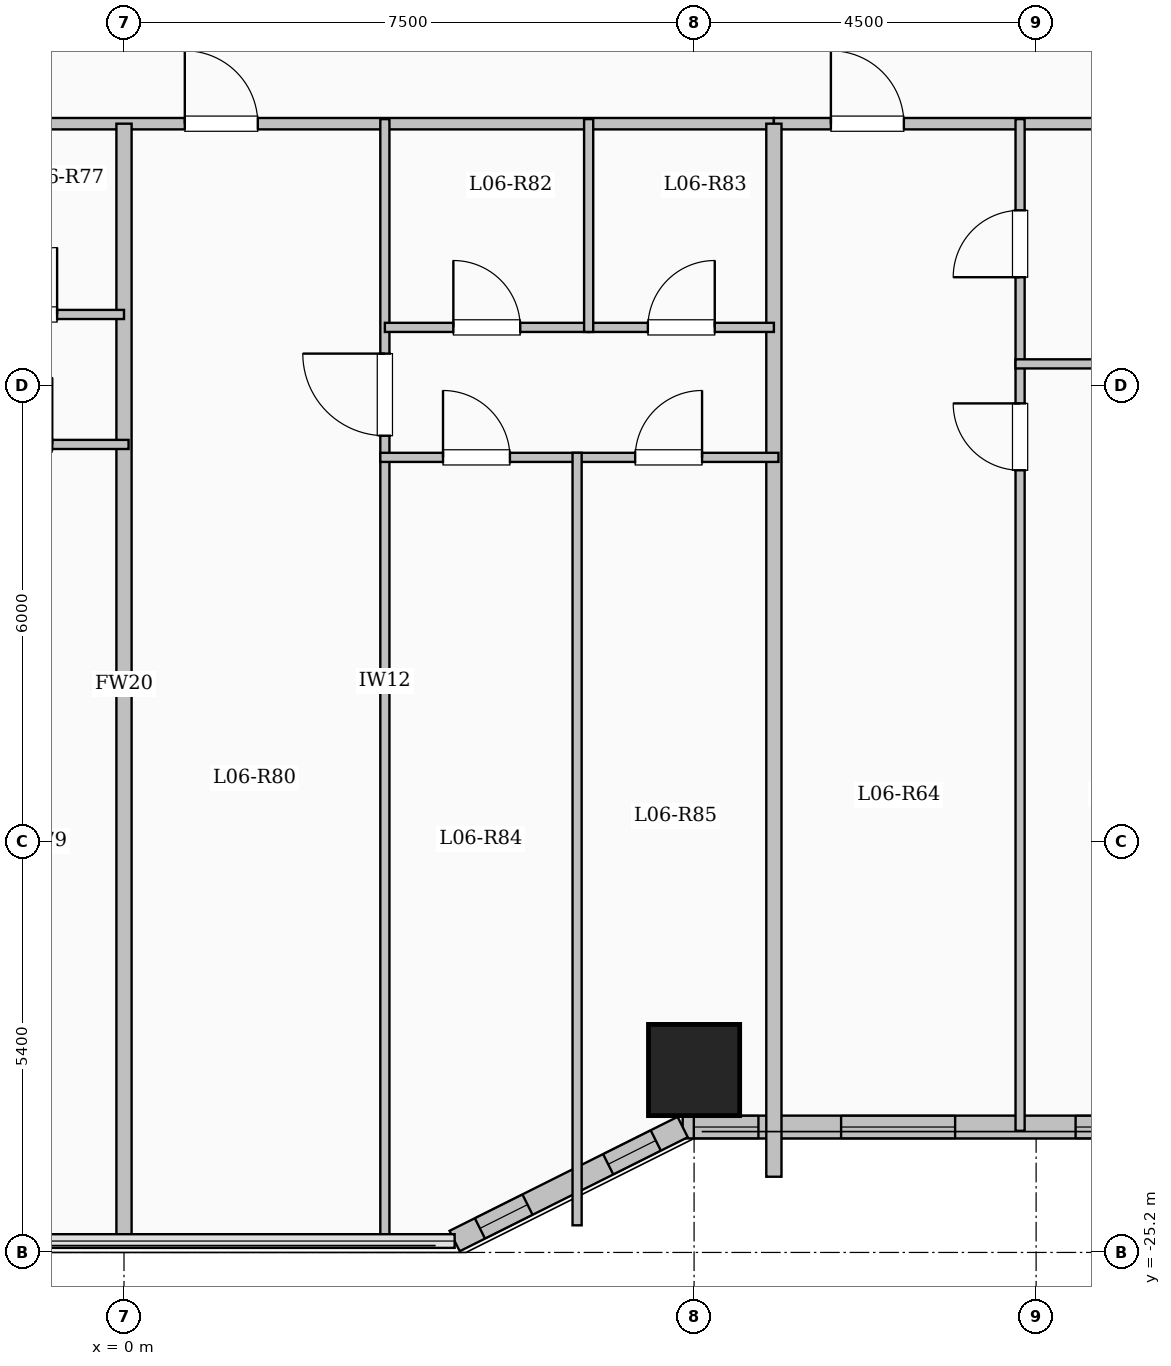
"""IFC4 building model, lengths in metres.
Left out: names, types, materials, properties, quantities, classifications, styles, units other than length and angle.
Written with IfcOpenShell. Run it as: python <this file> out.ifc"""

import sys

from ifc_helpers import new_model, si_unit, direction, frame, frame_2d, origin, origin_2d, place, context, subcontext, project, spatial, rectangle, extrude, element, fill, save


model = new_model("IFC4")
c1 = context("Model", 3, precision=1e-05, world=origin(), true_north=direction((0.0, 1.0)))
c2 = subcontext(c1, "Body", "Model", "MODEL_VIEW")
j1 = project(units=[si_unit("LENGTHUNIT", "METRE"), si_unit("PLANEANGLEUNIT", "RADIAN")], contexts=[c1])
p1 = place(None, origin())
s1 = spatial("IfcSite", under=j1, at=p1, CompositionType="ELEMENT")
p2 = place(p1, origin())
s2 = spatial("IfcBuilding", under=s1, at=p2, CompositionType="ELEMENT")
p3 = place(p2, frame((0.0, 0.0, 27.35)))
s3 = spatial("IfcBuildingStorey", under=s2, at=p3, CompositionType="ELEMENT", Elevation=27.35)
p4 = place(p3, frame((7.5, -22.8, 0.0), z_axis=(0.0, 0.0, 1.0), x_axis=(1.0, 0.0, 0.0)))
e1 = element("IfcColumn", 1, at=p4, inside=s3, PredefinedType="COLUMN", context=c2, shape_type="SweptSolid", body=[
    extrude(rectangle(XDim=1.2, YDim=1.2, at=origin_2d()), origin(), (0.0, 0.0, 1.0), 3.35),
])
p5 = place(p3, frame((22.65, -23.55, 0.0), z_axis=(0.0, 0.0, 1.0), x_axis=(-1.0, 0.0, 0.0)))
e2 = element("IfcWall", 2, at=p5, inside=s3, PredefinedType="SOLIDWALL", context=c2, shape_type="SweptSolid", body=[
    extrude(rectangle(XDim=15.3, YDim=0.3, at=frame_2d((7.65, 0.0))), origin(), (0.0, 0.0, 1.0), 3.1),
])
p6 = place(p5, frame((0.321, 0.0, 0.95)))
e3 = element("IfcOpeningElement", 3, at=p6, cuts=e2, PredefinedType="OPENING", context=c2, shape_type="SweptSolid", body=[
    extrude(rectangle(XDim=1.0, YDim=1.5, at=frame_2d((0.5, 0.75))), frame((0.0, 0.16, 0.0), z_axis=(0.0, -1.0, 0.0), x_axis=(1.0, 0.0, 0.0)), (0.0, 0.0, 1.0), 0.32),
])
p7 = place(p5, frame((2.031, 0.0, 0.95)))
e4 = element("IfcOpeningElement", 4, at=p7, cuts=e2, PredefinedType="OPENING", context=c2, shape_type="SweptSolid", body=[
    extrude(rectangle(XDim=0.85, YDim=1.5, at=frame_2d((0.425, 0.75))), frame((0.0, 0.16, 0.0), z_axis=(0.0, -1.0, 0.0), x_axis=(1.0, 0.0, 0.0)), (0.0, 0.0, 1.0), 0.32),
])
p8 = place(p5, frame((3.562, 0.0, 0.95)))
e5 = element("IfcOpeningElement", 5, at=p8, cuts=e2, PredefinedType="OPENING", context=c2, shape_type="SweptSolid", body=[
    extrude(rectangle(XDim=0.85, YDim=1.5, at=frame_2d((0.425, 0.75))), frame((0.0, 0.16, 0.0), z_axis=(0.0, -1.0, 0.0), x_axis=(1.0, 0.0, 0.0)), (0.0, 0.0, 1.0), 0.32),
])
p9 = place(p5, frame((5.571, 0.0, 0.9)))
e6 = element("IfcOpeningElement", 6, at=p9, cuts=e2, PredefinedType="OPENING", context=c2, shape_type="SweptSolid", body=[
    extrude(rectangle(XDim=1.5, YDim=1.65, at=frame_2d((0.75, 0.825))), frame((0.0, 0.16, 0.0), z_axis=(0.0, -1.0, 0.0), x_axis=(1.0, 0.0, 0.0)), (0.0, 0.0, 1.0), 0.32),
])
p10 = place(p5, frame((8.631, 0.0, 0.9)))
e7 = element("IfcOpeningElement", 7, at=p10, cuts=e2, PredefinedType="OPENING", context=c2, shape_type="SweptSolid", body=[
    extrude(rectangle(XDim=1.5, YDim=1.65, at=frame_2d((0.75, 0.825))), frame((0.0, 0.16, 0.0), z_axis=(0.0, -1.0, 0.0), x_axis=(1.0, 0.0, 0.0)), (0.0, 0.0, 1.0), 0.32),
])
p11 = place(p5, frame((11.716, 0.0, 0.9)))
e8 = element("IfcOpeningElement", 8, at=p11, cuts=e2, PredefinedType="OPENING", context=c2, shape_type="SweptSolid", body=[
    extrude(rectangle(XDim=1.5, YDim=1.65, at=frame_2d((0.75, 0.825))), frame((0.0, 0.16, 0.0), z_axis=(0.0, -1.0, 0.0), x_axis=(1.0, 0.0, 0.0)), (0.0, 0.0, 1.0), 0.32),
])
p12 = place(p5, frame((14.303, 0.0, 0.95)))
e9 = element("IfcOpeningElement", 9, at=p12, cuts=e2, PredefinedType="OPENING", context=c2, shape_type="SweptSolid", body=[
    extrude(rectangle(XDim=0.85, YDim=1.5, at=frame_2d((0.425, 0.75))), frame((0.0, 0.16, 0.0), z_axis=(0.0, -1.0, 0.0), x_axis=(1.0, 0.0, 0.0)), (0.0, 0.0, 1.0), 0.32),
])
p13 = place(p3, frame((7.35, -23.55, 0.0), z_axis=(0.0, 0.0, 1.0), x_axis=(-0.894427191, -0.4472135955, 0.0)))
e10 = element("IfcWall", 10, at=p13, inside=s3, PredefinedType="SOLIDWALL", context=c2, shape_type="SweptSolid", body=[
    extrude(rectangle(XDim=3.354, YDim=0.3, at=frame_2d((1.677, 0.0))), origin(), (0.0, 0.0, 1.0), 3.1),
])
p14 = place(p13, frame((0.396, 0.0, 0.95)))
e11 = element("IfcOpeningElement", 11, at=p14, cuts=e10, PredefinedType="OPENING", context=c2, shape_type="SweptSolid", body=[
    extrude(rectangle(XDim=0.7, YDim=1.5, at=frame_2d((0.35, 0.75))), frame((0.0, 0.16, 0.0), z_axis=(0.0, -1.0, 0.0), x_axis=(1.0, 0.0, 0.0)), (0.0, 0.0, 1.0), 0.32),
])
p15 = place(p13, frame((2.282, 0.0, 0.95)))
e12 = element("IfcOpeningElement", 12, at=p15, cuts=e10, PredefinedType="OPENING", context=c2, shape_type="SweptSolid", body=[
    extrude(rectangle(XDim=0.7, YDim=1.5, at=frame_2d((0.35, 0.75))), frame((0.0, 0.16, 0.0), z_axis=(0.0, -1.0, 0.0), x_axis=(1.0, 0.0, 0.0)), (0.0, 0.0, 1.0), 0.32),
])
p16 = place(p3, frame((-8.55, -10.35, 0.0), z_axis=(0.0, 0.0, 1.0), x_axis=(1.0, 0.0, 0.0)))
e13 = element("IfcWall", 13, at=p16, inside=s3, PredefinedType="PARTITIONING", context=c2, shape_type="SweptSolid", body=[
    extrude(rectangle(XDim=17.1, YDim=0.15, at=frame_2d((8.55, 0.0))), origin(), (0.0, 0.0, 1.0), 3.1),
])
p17 = place(p16, frame((0.8, 0.0, 0.0)))
e14 = element("IfcOpeningElement", 14, at=p17, cuts=e13, PredefinedType="OPENING", context=c2, shape_type="SweptSolid", body=[
    extrude(rectangle(XDim=0.96, YDim=2.15, at=frame_2d((0.48, 1.075))), frame((0.0, 0.085, 0.0), z_axis=(0.0, -1.0, 0.0), x_axis=(1.0, 0.0, 0.0)), (0.0, 0.0, 1.0), 0.17),
])
p18 = place(p16, frame((9.35, 0.0, 0.0)))
e15 = element("IfcOpeningElement", 15, at=p18, cuts=e13, PredefinedType="OPENING", context=c2, shape_type="SweptSolid", body=[
    extrude(rectangle(XDim=0.96, YDim=2.15, at=frame_2d((0.48, 1.075))), frame((0.0, 0.085, 0.0), z_axis=(0.0, -1.0, 0.0), x_axis=(1.0, 0.0, 0.0)), (0.0, 0.0, 1.0), 0.17),
])
p19 = place(p3, frame((8.55, -10.35, 0.0), z_axis=(0.0, 0.0, 1.0), x_axis=(1.0, 0.0, 0.0)))
e16 = element("IfcWall", 16, at=p19, inside=s3, PredefinedType="PARTITIONING", context=c2, shape_type="SweptSolid", body=[
    extrude(rectangle(XDim=14.0, YDim=0.15, at=frame_2d((7.0, 0.0))), origin(), (0.0, 0.0, 1.0), 3.1),
])
p20 = place(p19, frame((0.75, 0.0, 0.0)))
e17 = element("IfcOpeningElement", 17, at=p20, cuts=e16, PredefinedType="OPENING", context=c2, shape_type="SweptSolid", body=[
    extrude(rectangle(XDim=0.96, YDim=2.15, at=frame_2d((0.48, 1.075))), frame((0.0, 0.085, 0.0), z_axis=(0.0, -1.0, 0.0), x_axis=(1.0, 0.0, 0.0)), (0.0, 0.0, 1.0), 0.17),
])
p21 = place(p19, frame((6.888, 0.0, 0.0)))
e18 = element("IfcOpeningElement", 18, at=p21, cuts=e16, PredefinedType="OPENING", context=c2, shape_type="SweptSolid", body=[
    extrude(rectangle(XDim=0.96, YDim=2.15, at=frame_2d((0.48, 1.075))), frame((0.0, 0.085, 0.0), z_axis=(0.0, -1.0, 0.0), x_axis=(1.0, 0.0, 0.0)), (0.0, 0.0, 1.0), 0.17),
])
p22 = place(p3, frame((11.789, -23.6, 0.0), z_axis=(0.0, 0.0, 1.0), x_axis=(0.0, 1.0, 0.0)))
e19 = element("IfcWall", 19, at=p22, inside=s3, PredefinedType="PARTITIONING", context=c2, shape_type="SweptSolid", body=[
    extrude(rectangle(XDim=10.09, YDim=0.12, at=frame_2d((5.045, 0.0))), origin(), (0.0, 0.0, 1.0), 3.1),
])
p23 = place(p22, frame((8.69, 0.0, 0.0)))
e20 = element("IfcOpeningElement", 20, at=p23, cuts=e19, PredefinedType="OPENING", context=c2, shape_type="SweptSolid", body=[
    extrude(rectangle(XDim=0.88, YDim=2.1, at=frame_2d((0.44, 1.05))), frame((0.0, 0.07, 0.0), z_axis=(0.0, -1.0, 0.0), x_axis=(1.0, 0.0, 0.0)), (0.0, 0.0, 1.0), 0.14),
])
p24 = place(p3, frame((11.789, -13.51, 0.0), z_axis=(0.0, 0.0, 1.0), x_axis=(0.0, 1.0, 0.0)))
e21 = element("IfcWall", 21, at=p24, inside=s3, PredefinedType="PARTITIONING", context=c2, shape_type="SweptSolid", body=[
    extrude(rectangle(XDim=3.22, YDim=0.12, at=frame_2d((1.61, 0.0))), origin(), (0.0, 0.0, 1.0), 3.1),
])
p25 = place(p24, frame((1.14, 0.0, 0.0)))
e22 = element("IfcOpeningElement", 22, at=p25, cuts=e21, PredefinedType="OPENING", context=c2, shape_type="SweptSolid", body=[
    extrude(rectangle(XDim=0.88, YDim=2.1, at=frame_2d((0.44, 1.05))), frame((0.0, 0.07, 0.0), z_axis=(0.0, -1.0, 0.0), x_axis=(1.0, 0.0, 0.0)), (0.0, 0.0, 1.0), 0.14),
])
p26 = place(p3, frame((11.729, -13.51, 0.0), z_axis=(0.0, 0.0, 1.0), x_axis=(1.0, 0.0, 0.0)))
e23 = element("IfcWall", 23, at=p26, inside=s3, PredefinedType="PARTITIONING", context=c2, shape_type="SweptSolid", body=[
    extrude(rectangle(XDim=3.069, YDim=0.12, at=frame_2d((1.535, 0.0))), origin(), (0.0, 0.0, 1.0), 3.1),
])
p27 = place(p3, frame((8.55, -24.204, 0.0), z_axis=(0.0, 0.0, 1.0), x_axis=(0.0, 1.0, 0.0)))
e24 = element("IfcWall", 24, at=p27, inside=s3, PredefinedType="SOLIDWALL", context=c2, shape_type="SweptSolid", body=[
    extrude(rectangle(XDim=13.854, YDim=0.2, at=frame_2d((6.927, 0.0))), origin(), (0.0, 0.0, 1.0), 3.1),
])
p28 = place(p3, frame((0.0, -25.08, 0.0), z_axis=(0.0, 0.0, 1.0), x_axis=(0.0, 1.0, 0.0)))
e25 = element("IfcWall", 25, at=p28, inside=s3, PredefinedType="SOLIDWALL", context=c2, shape_type="SweptSolid", body=[
    extrude(rectangle(XDim=14.73, YDim=0.2, at=frame_2d((7.365, 0.0))), origin(), (0.0, 0.0, 1.0), 3.1),
])
p29 = place(p3, frame((-2.64, -12.86, 0.0), z_axis=(0.0, 0.0, 1.0), x_axis=(1.0, 0.0, 0.0)))
e26 = element("IfcWall", 26, at=p29, inside=s3, PredefinedType="PARTITIONING", context=c2, shape_type="SweptSolid", body=[
    extrude(rectangle(XDim=2.64, YDim=0.12, at=frame_2d((1.32, 0.0))), origin(), (0.0, 0.0, 1.0), 2.585),
])
p30 = place(p29, frame((0.88, 0.0, 0.0)))
e27 = element("IfcOpeningElement", 27, at=p30, cuts=e26, PredefinedType="OPENING", context=c2, shape_type="SweptSolid", body=[
    extrude(rectangle(XDim=0.88, YDim=2.1, at=frame_2d((0.44, 1.05))), frame((0.0, 0.07, 0.0), z_axis=(0.0, -1.0, 0.0), x_axis=(1.0, 0.0, 0.0)), (0.0, 0.0, 1.0), 0.14),
])
p31 = place(p3, frame((-5.178, -14.57, 0.0), z_axis=(0.0, 0.0, 1.0), x_axis=(1.0, 0.0, 0.0)))
e28 = element("IfcWall", 28, at=p31, inside=s3, PredefinedType="PARTITIONING", context=c2, shape_type="SweptSolid", body=[
    extrude(rectangle(XDim=5.238, YDim=0.12, at=frame_2d((2.619, 0.0))), origin(), (0.0, 0.0, 1.0), 3.1),
])
p32 = place(p31, frame((0.825, 0.0, 0.0)))
e29 = element("IfcOpeningElement", 29, at=p32, cuts=e28, PredefinedType="OPENING", context=c2, shape_type="SweptSolid", body=[
    extrude(rectangle(XDim=0.88, YDim=2.1, at=frame_2d((0.44, 1.05))), frame((0.0, 0.07, 0.0), z_axis=(0.0, -1.0, 0.0), x_axis=(1.0, 0.0, 0.0)), (0.0, 0.0, 1.0), 0.14),
])
p33 = place(p31, frame((3.354, 0.0, 0.0)))
e30 = element("IfcOpeningElement", 30, at=p33, cuts=e28, PredefinedType="OPENING", context=c2, shape_type="SweptSolid", body=[
    extrude(rectangle(XDim=0.88, YDim=2.1, at=frame_2d((0.44, 1.05))), frame((0.0, 0.07, 0.0), z_axis=(0.0, -1.0, 0.0), x_axis=(1.0, 0.0, 0.0)), (0.0, 0.0, 1.0), 0.14),
])
p34 = place(p3, frame((3.432, -25.08, 0.0), z_axis=(0.0, 0.0, 1.0), x_axis=(0.0, 1.0, 0.0)))
e31 = element("IfcWall", 31, at=p34, inside=s3, PredefinedType="PARTITIONING", context=c2, shape_type="SweptSolid", body=[
    extrude(rectangle(XDim=14.79, YDim=0.12, at=frame_2d((7.395, 0.0))), origin(), (0.0, 0.0, 1.0), 3.1),
])
p35 = place(p34, frame((10.625, 0.0, 0.0)))
e32 = element("IfcOpeningElement", 32, at=p35, cuts=e31, PredefinedType="OPENING", context=c2, shape_type="SweptSolid", body=[
    extrude(rectangle(XDim=1.08, YDim=2.15, at=frame_2d((0.54, 1.075))), frame((0.0, 0.07, 0.0), z_axis=(0.0, -1.0, 0.0), x_axis=(1.0, 0.0, 0.0)), (0.0, 0.0, 1.0), 0.14),
])
p36 = place(p3, frame((3.432, -13.03, 0.0), z_axis=(0.0, 0.0, 1.0), x_axis=(1.0, 0.0, 0.0)))
e33 = element("IfcWall", 33, at=p36, inside=s3, PredefinedType="PARTITIONING", context=c2, shape_type="SweptSolid", body=[
    extrude(rectangle(XDim=2.681, YDim=0.12, at=frame_2d((1.341, 0.0))), origin(), (0.0, 0.0, 1.0), 2.585),
])
p37 = place(p36, frame((0.901, 0.0, 0.0)))
e34 = element("IfcOpeningElement", 34, at=p37, cuts=e33, PredefinedType="OPENING", context=c2, shape_type="SweptSolid", body=[
    extrude(rectangle(XDim=0.88, YDim=2.1, at=frame_2d((0.44, 1.05))), frame((0.0, 0.07, 0.0), z_axis=(0.0, -1.0, 0.0), x_axis=(1.0, 0.0, 0.0)), (0.0, 0.0, 1.0), 0.14),
])
p38 = place(p3, frame((6.113, -13.03, 0.0), z_axis=(0.0, 0.0, 1.0), x_axis=(1.0, 0.0, 0.0)))
e35 = element("IfcWall", 35, at=p38, inside=s3, PredefinedType="PARTITIONING", context=c2, shape_type="SweptSolid", body=[
    extrude(rectangle(XDim=2.437, YDim=0.12, at=frame_2d((1.219, 0.0))), origin(), (0.0, 0.0, 1.0), 2.585),
])
p39 = place(p38, frame((0.779, 0.0, 0.0)))
e36 = element("IfcOpeningElement", 36, at=p39, cuts=e35, PredefinedType="OPENING", context=c2, shape_type="SweptSolid", body=[
    extrude(rectangle(XDim=0.88, YDim=2.1, at=frame_2d((0.44, 1.05))), frame((0.0, 0.07, 0.0), z_axis=(0.0, -1.0, 0.0), x_axis=(1.0, 0.0, 0.0)), (0.0, 0.0, 1.0), 0.14),
])
p40 = place(p3, frame((3.372, -14.74, 0.0), z_axis=(0.0, 0.0, 1.0), x_axis=(1.0, 0.0, 0.0)))
e37 = element("IfcWall", 37, at=p40, inside=s3, PredefinedType="PARTITIONING", context=c2, shape_type="SweptSolid", body=[
    extrude(rectangle(XDim=5.238, YDim=0.12, at=frame_2d((2.619, 0.0))), origin(), (0.0, 0.0, 1.0), 2.585),
])
p41 = place(p40, frame((0.825, 0.0, 0.0)))
e38 = element("IfcOpeningElement", 38, at=p41, cuts=e37, PredefinedType="OPENING", context=c2, shape_type="SweptSolid", body=[
    extrude(rectangle(XDim=0.88, YDim=2.1, at=frame_2d((0.44, 1.05))), frame((0.0, 0.07, 0.0), z_axis=(0.0, -1.0, 0.0), x_axis=(1.0, 0.0, 0.0)), (0.0, 0.0, 1.0), 0.14),
])
p42 = place(p40, frame((3.353, 0.0, 0.0)))
e39 = element("IfcOpeningElement", 39, at=p42, cuts=e37, PredefinedType="OPENING", context=c2, shape_type="SweptSolid", body=[
    extrude(rectangle(XDim=0.88, YDim=2.1, at=frame_2d((0.44, 1.05))), frame((0.0, 0.07, 0.0), z_axis=(0.0, -1.0, 0.0), x_axis=(1.0, 0.0, 0.0)), (0.0, 0.0, 1.0), 0.14),
])
p43 = place(p3, frame((6.113, -13.09, 0.0), z_axis=(0.0, 0.0, 1.0), x_axis=(0.0, 1.0, 0.0)))
e40 = element("IfcWall", 40, at=p43, inside=s3, PredefinedType="PARTITIONING", context=c2, shape_type="SweptSolid", body=[
    extrude(rectangle(XDim=2.8, YDim=0.12, at=frame_2d((1.4, 0.0))), origin(), (0.0, 0.0, 1.0), 3.1),
])
p44 = place(p3, frame((5.961, -24.843, 0.0), z_axis=(0.0, 0.0, 1.0), x_axis=(0.0, 1.0, 0.0)))
e41 = element("IfcWall", 41, at=p44, inside=s3, PredefinedType="PARTITIONING", context=c2, shape_type="SweptSolid", body=[
    extrude(rectangle(XDim=10.163, YDim=0.12, at=frame_2d((5.082, 0.0))), origin(), (0.0, 0.0, 1.0), 3.1),
])
p45 = place(p10, origin())
e42 = element("IfcWindow", 42, at=p45, inside=s3, PartitioningType="SINGLE_PANEL", PredefinedType="WINDOW", context=c2, shape_type="SweptSolid", body=[
    extrude(rectangle(XDim=1.5, YDim=1.65, at=frame_2d((0.75, 0.825))), frame((0.0, 0.03, 0.0), z_axis=(0.0, -1.0, 0.0), x_axis=(1.0, 0.0, 0.0)), (0.0, 0.0, 1.0), 0.06),
])
fill(e7, e42)
p46 = place(p11, origin())
e43 = element("IfcWindow", 43, at=p46, inside=s3, PartitioningType="SINGLE_PANEL", PredefinedType="WINDOW", context=c2, shape_type="SweptSolid", body=[
    extrude(rectangle(XDim=1.5, YDim=1.65, at=frame_2d((0.75, 0.825))), frame((0.0, 0.03, 0.0), z_axis=(0.0, -1.0, 0.0), x_axis=(1.0, 0.0, 0.0)), (0.0, 0.0, 1.0), 0.06),
])
fill(e8, e43)
p47 = place(p12, origin())
e44 = element("IfcWindow", 44, at=p47, inside=s3, PartitioningType="SINGLE_PANEL", PredefinedType="WINDOW", context=c2, shape_type="SweptSolid", body=[
    extrude(rectangle(XDim=0.85, YDim=1.5, at=frame_2d((0.425, 0.75))), frame((0.0, 0.03, 0.0), z_axis=(0.0, -1.0, 0.0), x_axis=(1.0, 0.0, 0.0)), (0.0, 0.0, 1.0), 0.06),
])
fill(e9, e44)
p48 = place(p14, origin())
e45 = element("IfcWindow", 45, at=p48, inside=s3, PartitioningType="SINGLE_PANEL", PredefinedType="WINDOW", context=c2, shape_type="SweptSolid", body=[
    extrude(rectangle(XDim=0.7, YDim=1.5, at=frame_2d((0.35, 0.75))), frame((0.0, 0.03, 0.0), z_axis=(0.0, -1.0, 0.0), x_axis=(1.0, 0.0, 0.0)), (0.0, 0.0, 1.0), 0.06),
])
fill(e11, e45)
p49 = place(p15, origin())
e46 = element("IfcWindow", 46, at=p49, inside=s3, PartitioningType="SINGLE_PANEL", PredefinedType="WINDOW", context=c2, shape_type="SweptSolid", body=[
    extrude(rectangle(XDim=0.7, YDim=1.5, at=frame_2d((0.35, 0.75))), frame((0.0, 0.03, 0.0), z_axis=(0.0, -1.0, 0.0), x_axis=(1.0, 0.0, 0.0)), (0.0, 0.0, 1.0), 0.06),
])
fill(e12, e46)
p50 = place(p20, origin())
e47 = element("IfcDoor", 47, at=p50, inside=s3, OperationType="SINGLE_SWING_LEFT", PredefinedType="DOOR", context=c2, shape_type="SweptSolid", body=[
    extrude(rectangle(XDim=0.96, YDim=2.15, at=frame_2d((0.48, 1.075))), frame((0.0, 0.025, 0.0), z_axis=(0.0, -1.0, 0.0), x_axis=(1.0, 0.0, 0.0)), (0.0, 0.0, 1.0), 0.05),
])
fill(e17, e47)
p51 = place(p23, origin())
e48 = element("IfcDoor", 48, at=p51, inside=s3, OperationType="SINGLE_SWING_RIGHT", PredefinedType="DOOR", context=c2, shape_type="SweptSolid", body=[
    extrude(rectangle(XDim=0.88, YDim=2.1, at=frame_2d((0.44, 1.05))), frame((0.0, 0.025, 0.0), z_axis=(0.0, -1.0, 0.0), x_axis=(1.0, 0.0, 0.0)), (0.0, 0.0, 1.0), 0.05),
])
fill(e20, e48)
p52 = place(p25, origin())
e49 = element("IfcDoor", 49, at=p52, inside=s3, OperationType="SINGLE_SWING_LEFT", PredefinedType="DOOR", context=c2, shape_type="SweptSolid", body=[
    extrude(rectangle(XDim=0.88, YDim=2.1, at=frame_2d((0.44, 1.05))), frame((0.0, 0.025, 0.0), z_axis=(0.0, -1.0, 0.0), x_axis=(1.0, 0.0, 0.0)), (0.0, 0.0, 1.0), 0.05),
])
fill(e22, e49)
p53 = place(p30, origin())
e50 = element("IfcDoor", 50, at=p53, inside=s3, OperationType="SINGLE_SWING_RIGHT", PredefinedType="DOOR", context=c2, shape_type="SweptSolid", body=[
    extrude(rectangle(XDim=0.88, YDim=2.1, at=frame_2d((0.44, 1.05))), frame((0.0, 0.025, 0.0), z_axis=(0.0, -1.0, 0.0), x_axis=(1.0, 0.0, 0.0)), (0.0, 0.0, 1.0), 0.05),
])
fill(e27, e50)
p54 = place(p18, origin())
e51 = element("IfcDoor", 51, at=p54, inside=s3, OperationType="SINGLE_SWING_LEFT", PredefinedType="DOOR", context=c2, shape_type="SweptSolid", body=[
    extrude(rectangle(XDim=0.96, YDim=2.15, at=frame_2d((0.48, 1.075))), frame((0.0, 0.025, 0.0), z_axis=(0.0, -1.0, 0.0), x_axis=(1.0, 0.0, 0.0)), (0.0, 0.0, 1.0), 0.05),
])
fill(e15, e51)
p55 = place(p35, origin())
e52 = element("IfcDoor", 52, at=p55, inside=s3, OperationType="SINGLE_SWING_RIGHT", PredefinedType="DOOR", context=c2, shape_type="SweptSolid", body=[
    extrude(rectangle(XDim=1.08, YDim=2.15, at=frame_2d((0.54, 1.075))), frame((0.0, 0.025, 0.0), z_axis=(0.0, -1.0, 0.0), x_axis=(1.0, 0.0, 0.0)), (0.0, 0.0, 1.0), 0.05),
])
fill(e32, e52)
p56 = place(p37, origin())
e53 = element("IfcDoor", 53, at=p56, inside=s3, OperationType="SINGLE_SWING_LEFT", PredefinedType="DOOR", context=c2, shape_type="SweptSolid", body=[
    extrude(rectangle(XDim=0.88, YDim=2.1, at=frame_2d((0.44, 1.05))), frame((0.0, 0.025, 0.0), z_axis=(0.0, -1.0, 0.0), x_axis=(1.0, 0.0, 0.0)), (0.0, 0.0, 1.0), 0.05),
])
fill(e34, e53)
p57 = place(p39, origin())
e54 = element("IfcDoor", 54, at=p57, inside=s3, OperationType="SINGLE_SWING_RIGHT", PredefinedType="DOOR", context=c2, shape_type="SweptSolid", body=[
    extrude(rectangle(XDim=0.88, YDim=2.1, at=frame_2d((0.44, 1.05))), frame((0.0, 0.025, 0.0), z_axis=(0.0, -1.0, 0.0), x_axis=(1.0, 0.0, 0.0)), (0.0, 0.0, 1.0), 0.05),
])
fill(e36, e54)
p58 = place(p41, origin())
e55 = element("IfcDoor", 55, at=p58, inside=s3, OperationType="SINGLE_SWING_LEFT", PredefinedType="DOOR", context=c2, shape_type="SweptSolid", body=[
    extrude(rectangle(XDim=0.88, YDim=2.1, at=frame_2d((0.44, 1.05))), frame((0.0, 0.025, 0.0), z_axis=(0.0, -1.0, 0.0), x_axis=(1.0, 0.0, 0.0)), (0.0, 0.0, 1.0), 0.05),
])
fill(e38, e55)
p59 = place(p42, origin())
e56 = element("IfcDoor", 56, at=p59, inside=s3, OperationType="SINGLE_SWING_RIGHT", PredefinedType="DOOR", context=c2, shape_type="SweptSolid", body=[
    extrude(rectangle(XDim=0.88, YDim=2.1, at=frame_2d((0.44, 1.05))), frame((0.0, 0.025, 0.0), z_axis=(0.0, -1.0, 0.0), x_axis=(1.0, 0.0, 0.0)), (0.0, 0.0, 1.0), 0.05),
])
fill(e39, e56)
save(model, sys.argv[1])
